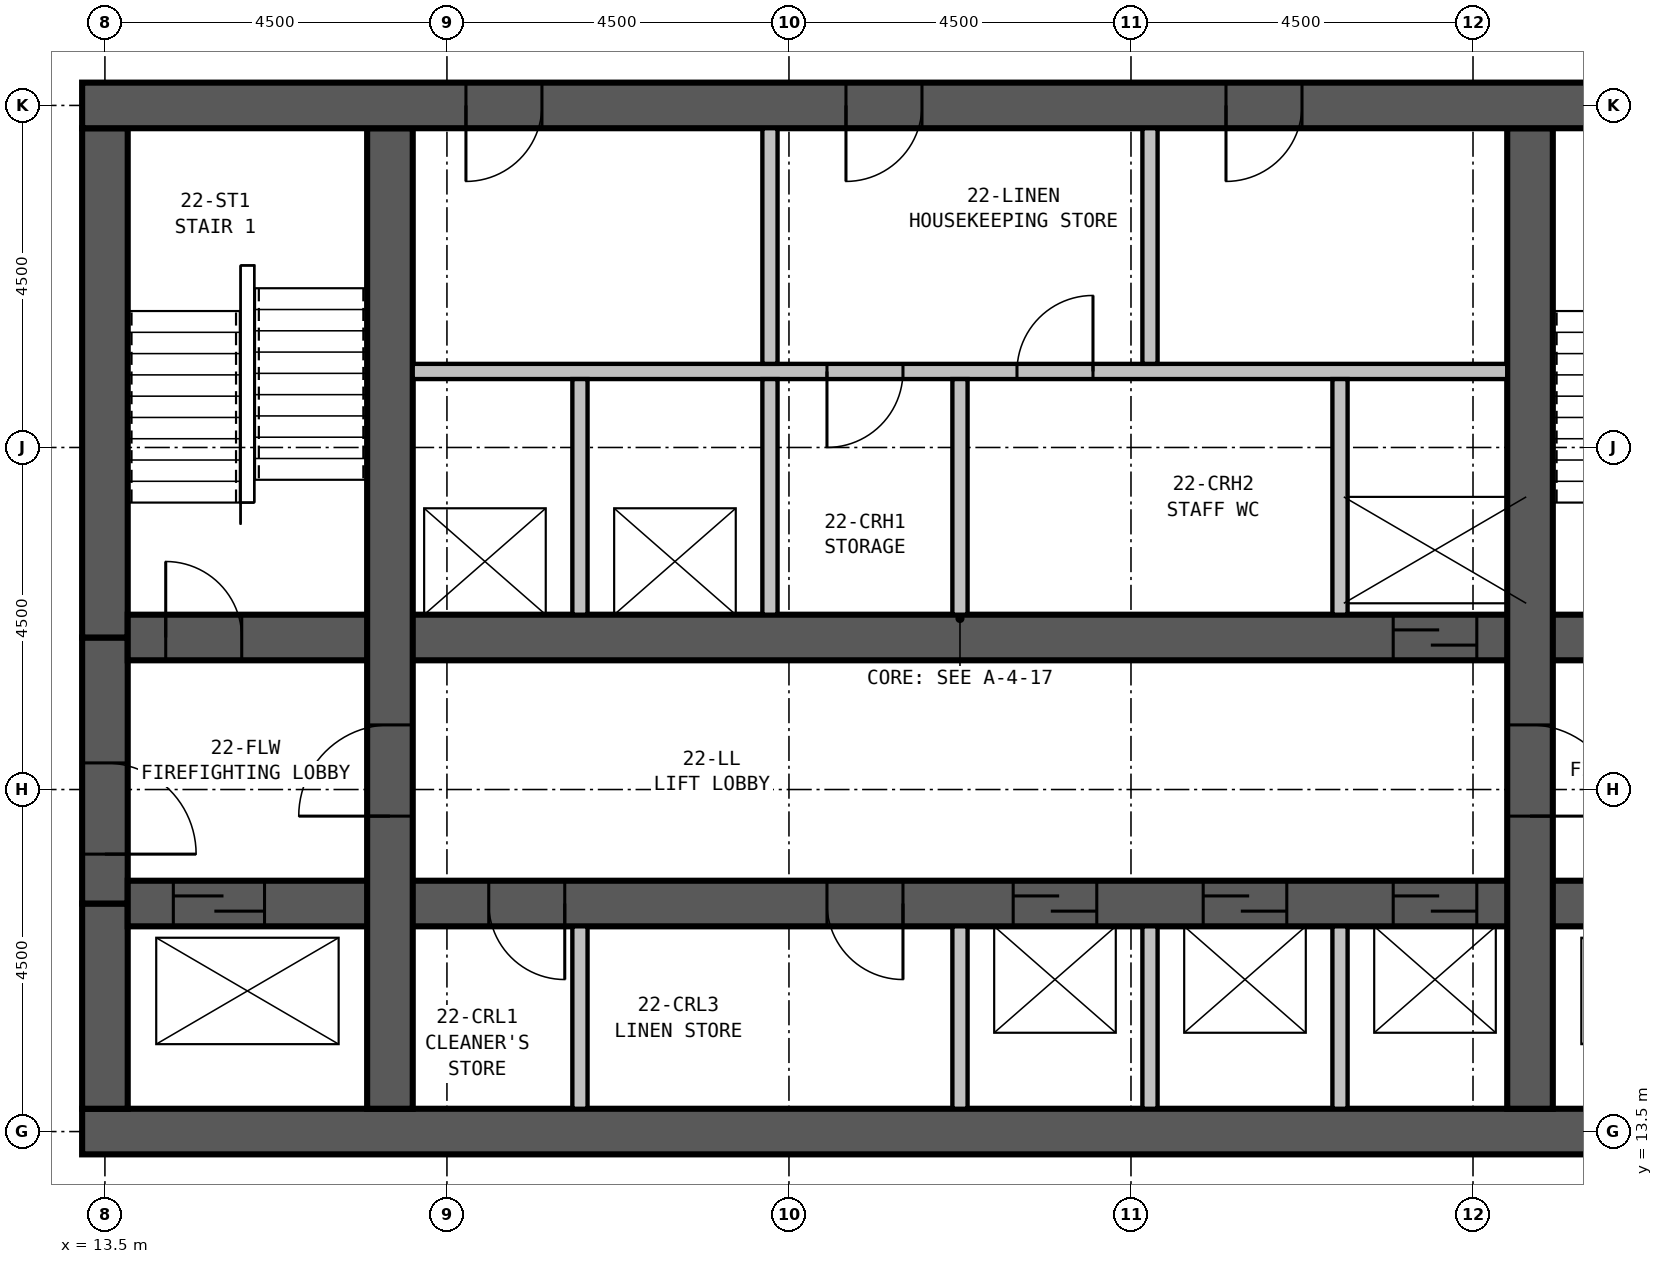
"""IFC4 building model, lengths in metres.
Left out: names, types, materials, properties, quantities, classifications, styles, units other than length and angle.
Written with IfcOpenShell. Run it as: python <this file> out.ifc"""

import sys

from ifc_helpers import new_model, si_unit, direction, frame, frame_2d, origin, place, context, subcontext, project, spatial, rectangle, extrude, element, fill, save


model = new_model("IFC4")
c1 = context("Model", 3, precision=1e-05, world=origin(), true_north=direction((0.0, 1.0)))
c2 = subcontext(c1, "Body", "Model", "MODEL_VIEW")
j1 = project(units=[si_unit("LENGTHUNIT", "METRE"), si_unit("PLANEANGLEUNIT", "RADIAN")], contexts=[c1])
p1 = place(None, origin())
s1 = spatial("IfcSite", under=j1, at=p1, CompositionType="ELEMENT")
p2 = place(p1, origin())
s2 = spatial("IfcBuilding", under=s1, at=p2, CompositionType="ELEMENT")
p3 = place(p2, frame((0.0, 0.0, 89.9)))
s3 = spatial("IfcBuildingStorey", under=s2, at=p3, CompositionType="ELEMENT", Elevation=89.9)
p4 = place(p3, frame((13.2, 13.5, 0.0), z_axis=(0.0, 0.0, 1.0), x_axis=(1.0, 0.0, 0.0)))
e1 = element("IfcWall", 1, at=p4, inside=s3, PredefinedType="SHEAR", context=c2, shape_type="SweptSolid", body=[
    extrude(rectangle(XDim=23.1, YDim=0.6, at=frame_2d((11.55, 0.0))), origin(), (0.0, 0.0, 1.0), 3.5),
])
p5 = place(p3, frame((36.3, 27.0, 0.0), z_axis=(0.0, 0.0, 1.0), x_axis=(-1.0, 0.0, 0.0)))
e2 = element("IfcWall", 2, at=p5, inside=s3, PredefinedType="SHEAR", context=c2, shape_type="SweptSolid", body=[
    extrude(rectangle(XDim=23.1, YDim=0.6, at=frame_2d((11.55, 0.0))), origin(), (0.0, 0.0, 1.0), 3.5),
])
p6 = place(p5, frame((17.05, 0.0, 0.0)))
e3 = element("IfcOpeningElement", 3, at=p6, cuts=e2, PredefinedType="OPENING", context=c2, shape_type="SweptSolid", body=[
    extrude(rectangle(XDim=1.0, YDim=2.1, at=frame_2d((0.5, 1.05))), frame((0.0, 0.31, 0.0), z_axis=(0.0, -1.0, 0.0), x_axis=(1.0, 0.0, 0.0)), (0.0, 0.0, 1.0), 0.62),
])
p7 = place(p5, frame((12.05, 0.0, 0.0)))
e4 = element("IfcOpeningElement", 4, at=p7, cuts=e2, PredefinedType="OPENING", context=c2, shape_type="SweptSolid", body=[
    extrude(rectangle(XDim=1.0, YDim=2.1, at=frame_2d((0.5, 1.05))), frame((0.0, 0.31, 0.0), z_axis=(0.0, -1.0, 0.0), x_axis=(1.0, 0.0, 0.0)), (0.0, 0.0, 1.0), 0.62),
])
p8 = place(p5, frame((7.05, 0.0, 0.0)))
e5 = element("IfcOpeningElement", 5, at=p8, cuts=e2, PredefinedType="OPENING", context=c2, shape_type="SweptSolid", body=[
    extrude(rectangle(XDim=1.0, YDim=2.1, at=frame_2d((0.5, 1.05))), frame((0.0, 0.31, 0.0), z_axis=(0.0, -1.0, 0.0), x_axis=(1.0, 0.0, 0.0)), (0.0, 0.0, 1.0), 0.62),
])
p9 = place(p3, frame((17.25, 13.8, 0.0), z_axis=(0.0, 0.0, 1.0), x_axis=(0.0, 1.0, 0.0)))
e6 = element("IfcWall", 6, at=p9, inside=s3, PredefinedType="SHEAR", context=c2, shape_type="SweptSolid", body=[
    extrude(rectangle(XDim=12.9, YDim=0.6, at=frame_2d((6.45, 0.0))), origin(), (0.0, 0.0, 1.0), 3.5),
])
p10 = place(p9, frame((3.85, 0.0, 0.0)))
e7 = element("IfcOpeningElement", 7, at=p10, cuts=e6, PredefinedType="OPENING", context=c2, shape_type="SweptSolid", body=[
    extrude(rectangle(XDim=1.2, YDim=2.1, at=frame_2d((0.6, 1.05))), frame((0.0, 0.31, 0.0), z_axis=(0.0, -1.0, 0.0), x_axis=(1.0, 0.0, 0.0)), (0.0, 0.0, 1.0), 0.62),
])
p11 = place(p3, frame((32.25, 13.8, 0.0), z_axis=(0.0, 0.0, 1.0), x_axis=(0.0, 1.0, 0.0)))
e8 = element("IfcWall", 8, at=p11, inside=s3, PredefinedType="SHEAR", context=c2, shape_type="SweptSolid", body=[
    extrude(rectangle(XDim=12.9, YDim=0.6, at=frame_2d((6.45, 0.0))), origin(), (0.0, 0.0, 1.0), 3.5),
])
p12 = place(p11, frame((5.05, 0.0, 0.0), z_axis=(0.0, 0.0, 1.0), x_axis=(-1.0, 0.0, 0.0)))
e9 = element("IfcOpeningElement", 9, at=p12, cuts=e8, PredefinedType="OPENING", context=c2, shape_type="SweptSolid", body=[
    extrude(rectangle(XDim=1.2, YDim=2.1, at=frame_2d((0.6, 1.05))), frame((0.0, 0.31, 0.0), z_axis=(0.0, -1.0, 0.0), x_axis=(1.0, 0.0, 0.0)), (0.0, 0.0, 1.0), 0.62),
])
p13 = place(p3, frame((13.8, 16.5, 0.0), z_axis=(0.0, 0.0, 1.0), x_axis=(1.0, 0.0, 0.0)))
e10 = element("IfcWall", 10, at=p13, inside=s3, PredefinedType="SHEAR", context=c2, shape_type="SweptSolid", body=[
    extrude(rectangle(XDim=21.9, YDim=0.6, at=frame_2d((10.95, 0.0))), origin(), (0.0, 0.0, 1.0), 3.5),
])
p14 = place(p13, frame((11.65, 0.0, 0.0)))
e11 = element("IfcOpeningElement", 11, at=p14, cuts=e10, PredefinedType="OPENING", context=c2, shape_type="SweptSolid", body=[
    extrude(rectangle(XDim=1.1, YDim=2.1, at=frame_2d((0.55, 1.05))), frame((0.0, 0.31, 0.0), z_axis=(0.0, -1.0, 0.0), x_axis=(1.0, 0.0, 0.0)), (0.0, 0.0, 1.0), 0.62),
])
p15 = place(p13, frame((14.15, 0.0, 0.0)))
e12 = element("IfcOpeningElement", 12, at=p15, cuts=e10, PredefinedType="OPENING", context=c2, shape_type="SweptSolid", body=[
    extrude(rectangle(XDim=1.1, YDim=2.1, at=frame_2d((0.55, 1.05))), frame((0.0, 0.31, 0.0), z_axis=(0.0, -1.0, 0.0), x_axis=(1.0, 0.0, 0.0)), (0.0, 0.0, 1.0), 0.62),
])
p16 = place(p13, frame((16.65, 0.0, 0.0)))
e13 = element("IfcOpeningElement", 13, at=p16, cuts=e10, PredefinedType="OPENING", context=c2, shape_type="SweptSolid", body=[
    extrude(rectangle(XDim=1.1, YDim=2.1, at=frame_2d((0.55, 1.05))), frame((0.0, 0.31, 0.0), z_axis=(0.0, -1.0, 0.0), x_axis=(1.0, 0.0, 0.0)), (0.0, 0.0, 1.0), 0.62),
])
p17 = place(p13, frame((5.75, 0.0, 0.0), z_axis=(0.0, 0.0, 1.0), x_axis=(-1.0, 0.0, 0.0)))
e14 = element("IfcOpeningElement", 14, at=p17, cuts=e10, PredefinedType="OPENING", context=c2, shape_type="SweptSolid", body=[
    extrude(rectangle(XDim=1.0, YDim=2.1, at=frame_2d((0.5, 1.05))), frame((0.0, 0.31, 0.0), z_axis=(0.0, -1.0, 0.0), x_axis=(1.0, 0.0, 0.0)), (0.0, 0.0, 1.0), 0.62),
])
p18 = place(p13, frame((10.2, 0.0, 0.0), z_axis=(0.0, 0.0, 1.0), x_axis=(-1.0, 0.0, 0.0)))
e15 = element("IfcOpeningElement", 15, at=p18, cuts=e10, PredefinedType="OPENING", context=c2, shape_type="SweptSolid", body=[
    extrude(rectangle(XDim=1.0, YDim=2.1, at=frame_2d((0.5, 1.05))), frame((0.0, 0.31, 0.0), z_axis=(0.0, -1.0, 0.0), x_axis=(1.0, 0.0, 0.0)), (0.0, 0.0, 1.0), 0.62),
])
p19 = place(p13, frame((0.6, 0.0, 0.0)))
e16 = element("IfcOpeningElement", 16, at=p19, cuts=e10, PredefinedType="OPENING", context=c2, shape_type="SweptSolid", body=[
    extrude(rectangle(XDim=1.2, YDim=2.1, at=frame_2d((0.6, 1.05))), frame((0.0, 0.31, 0.0), z_axis=(0.0, -1.0, 0.0), x_axis=(1.0, 0.0, 0.0)), (0.0, 0.0, 1.0), 0.62),
])
p20 = place(p13, frame((19.6, 0.0, 0.0)))
e17 = element("IfcOpeningElement", 17, at=p20, cuts=e10, PredefinedType="OPENING", context=c2, shape_type="SweptSolid", body=[
    extrude(rectangle(XDim=1.2, YDim=2.1, at=frame_2d((0.6, 1.05))), frame((0.0, 0.31, 0.0), z_axis=(0.0, -1.0, 0.0), x_axis=(1.0, 0.0, 0.0)), (0.0, 0.0, 1.0), 0.62),
])
p21 = place(p3, frame((13.8, 20.0, 0.0), z_axis=(0.0, 0.0, 1.0), x_axis=(1.0, 0.0, 0.0)))
e18 = element("IfcWall", 18, at=p21, inside=s3, PredefinedType="SHEAR", context=c2, shape_type="SweptSolid", body=[
    extrude(rectangle(XDim=21.9, YDim=0.6, at=frame_2d((10.95, 0.0))), origin(), (0.0, 0.0, 1.0), 3.5),
])
p22 = place(p21, frame((0.5, 0.0, 0.0)))
e19 = element("IfcOpeningElement", 19, at=p22, cuts=e18, PredefinedType="OPENING", context=c2, shape_type="SweptSolid", body=[
    extrude(rectangle(XDim=1.0, YDim=2.1, at=frame_2d((0.5, 1.05))), frame((0.0, 0.31, 0.0), z_axis=(0.0, -1.0, 0.0), x_axis=(1.0, 0.0, 0.0)), (0.0, 0.0, 1.0), 0.62),
])
p23 = place(p21, frame((20.5, 0.0, 0.0)))
e20 = element("IfcOpeningElement", 20, at=p23, cuts=e18, PredefinedType="OPENING", context=c2, shape_type="SweptSolid", body=[
    extrude(rectangle(XDim=1.0, YDim=2.1, at=frame_2d((0.5, 1.05))), frame((0.0, 0.31, 0.0), z_axis=(0.0, -1.0, 0.0), x_axis=(1.0, 0.0, 0.0)), (0.0, 0.0, 1.0), 0.62),
])
p24 = place(p21, frame((16.65, 0.0, 0.0)))
e21 = element("IfcOpeningElement", 21, at=p24, cuts=e18, PredefinedType="OPENING", context=c2, shape_type="SweptSolid", body=[
    extrude(rectangle(XDim=1.1, YDim=2.1, at=frame_2d((0.55, 1.05))), frame((0.0, 0.31, 0.0), z_axis=(0.0, -1.0, 0.0), x_axis=(1.0, 0.0, 0.0)), (0.0, 0.0, 1.0), 0.62),
])
p25 = place(p3, frame((13.5, 26.7, 0.0), z_axis=(0.0, 0.0, 1.0), x_axis=(0.0, -1.0, 0.0)))
e22 = element("IfcWall", 22, at=p25, inside=s3, PredefinedType="SHEAR", context=c2, shape_type="SweptSolid", body=[
    extrude(rectangle(XDim=6.7, YDim=0.6, at=frame_2d((3.35, 0.0))), origin(), (0.0, 0.0, 1.0), 3.5),
])
p26 = place(p3, frame((13.5, 20.0, 0.0), z_axis=(0.0, 0.0, 1.0), x_axis=(0.0, -1.0, 0.0)))
e23 = element("IfcWall", 23, at=p26, inside=s3, PredefinedType="SHEAR", context=c2, shape_type="SweptSolid", body=[
    extrude(rectangle(XDim=3.5, YDim=0.6, at=frame_2d((1.75, 0.0))), origin(), (0.0, 0.0, 1.0), 3.5),
])
p27 = place(p26, frame((1.65, 0.0, 0.0)))
e24 = element("IfcOpeningElement", 24, at=p27, cuts=e23, PredefinedType="OPENING", context=c2, shape_type="SweptSolid", body=[
    extrude(rectangle(XDim=1.2, YDim=2.1, at=frame_2d((0.6, 1.05))), frame((0.0, 0.31, 0.0), z_axis=(0.0, -1.0, 0.0), x_axis=(1.0, 0.0, 0.0)), (0.0, 0.0, 1.0), 0.62),
])
p28 = place(p3, frame((13.5, 16.5, 0.0), z_axis=(0.0, 0.0, 1.0), x_axis=(0.0, -1.0, 0.0)))
e25 = element("IfcWall", 25, at=p28, inside=s3, PredefinedType="SHEAR", context=c2, shape_type="SweptSolid", body=[
    extrude(rectangle(XDim=2.7, YDim=0.6, at=frame_2d((1.35, 0.0))), origin(), (0.0, 0.0, 1.0), 3.5),
])
p29 = place(p3, frame((19.75, 13.8, 0.0), z_axis=(0.0, 0.0, 1.0), x_axis=(0.0, 1.0, 0.0)))
e26 = element("IfcWall", 26, at=p29, inside=s3, PredefinedType="PARTITIONING", context=c2, shape_type="SweptSolid", body=[
    extrude(rectangle(XDim=2.4, YDim=0.2, at=frame_2d((1.2, 0.0))), origin(), (0.0, 0.0, 1.0), 3.25),
])
for number, where, z_axis, x_axis in (
    (27, (19.75, 20.3, 0.0), (0.0, 0.0, 1.0), (0.0, 1.0, 0.0)),
    (28, (22.25, 20.3, 0.0), (0.0, 0.0, 1.0), (0.0, 1.0, 0.0)),
):
    element("IfcWall", number, at=place(p3, frame(where, z_axis=z_axis, x_axis=x_axis)), inside=s3, PredefinedType="PARTITIONING", context=c2, shape_type="SweptSolid", body=[
        extrude(rectangle(XDim=3.1, YDim=0.2, at=frame_2d((1.55, 0.0))), origin(), (0.0, 0.0, 1.0), 3.25),
    ])
p30 = place(p3, frame((24.75, 13.8, 0.0), z_axis=(0.0, 0.0, 1.0), x_axis=(0.0, 1.0, 0.0)))
e29 = element("IfcWall", 29, at=p30, inside=s3, PredefinedType="PARTITIONING", context=c2, shape_type="SweptSolid", body=[
    extrude(rectangle(XDim=2.4, YDim=0.2, at=frame_2d((1.2, 0.0))), origin(), (0.0, 0.0, 1.0), 3.25),
])
p31 = place(p3, frame((24.75, 20.3, 0.0), z_axis=(0.0, 0.0, 1.0), x_axis=(0.0, 1.0, 0.0)))
e30 = element("IfcWall", 30, at=p31, inside=s3, PredefinedType="PARTITIONING", context=c2, shape_type="SweptSolid", body=[
    extrude(rectangle(XDim=3.1, YDim=0.2, at=frame_2d((1.55, 0.0))), origin(), (0.0, 0.0, 1.0), 3.25),
])
for number, where, z_axis, x_axis in (
    (31, (27.25, 13.8, 0.0), (0.0, 0.0, 1.0), (0.0, 1.0, 0.0)),
    (32, (29.75, 13.8, 0.0), (0.0, 0.0, 1.0), (0.0, 1.0, 0.0)),
):
    element("IfcWall", number, at=place(p3, frame(where, z_axis=z_axis, x_axis=x_axis)), inside=s3, PredefinedType="PARTITIONING", context=c2, shape_type="SweptSolid", body=[
        extrude(rectangle(XDim=2.4, YDim=0.2, at=frame_2d((1.2, 0.0))), origin(), (0.0, 0.0, 1.0), 3.25),
    ])
p32 = place(p3, frame((29.75, 20.3, 0.0), z_axis=(0.0, 0.0, 1.0), x_axis=(0.0, 1.0, 0.0)))
e33 = element("IfcWall", 33, at=p32, inside=s3, PredefinedType="PARTITIONING", context=c2, shape_type="SweptSolid", body=[
    extrude(rectangle(XDim=3.1, YDim=0.2, at=frame_2d((1.55, 0.0))), origin(), (0.0, 0.0, 1.0), 3.25),
])
p33 = place(p3, frame((17.55, 23.5, 0.0), z_axis=(0.0, 0.0, 1.0), x_axis=(1.0, 0.0, 0.0)))
e34 = element("IfcWall", 34, at=p33, inside=s3, PredefinedType="PARTITIONING", context=c2, shape_type="SweptSolid", body=[
    extrude(rectangle(XDim=14.4, YDim=0.2, at=frame_2d((7.2, 0.0))), origin(), (0.0, 0.0, 1.0), 3.25),
])
p34 = place(p33, frame((6.45, 0.0, 0.0), z_axis=(0.0, 0.0, 1.0), x_axis=(-1.0, 0.0, 0.0)))
e35 = element("IfcOpeningElement", 35, at=p34, cuts=e34, PredefinedType="OPENING", context=c2, shape_type="SweptSolid", body=[
    extrude(rectangle(XDim=1.0, YDim=2.1, at=frame_2d((0.5, 1.05))), frame((0.0, 0.11, 0.0), z_axis=(0.0, -1.0, 0.0), x_axis=(1.0, 0.0, 0.0)), (0.0, 0.0, 1.0), 0.22),
])
p35 = place(p33, frame((7.95, 0.0, 0.0)))
e36 = element("IfcOpeningElement", 36, at=p35, cuts=e34, PredefinedType="OPENING", context=c2, shape_type="SweptSolid", body=[
    extrude(rectangle(XDim=1.0, YDim=2.1, at=frame_2d((0.5, 1.05))), frame((0.0, 0.11, 0.0), z_axis=(0.0, -1.0, 0.0), x_axis=(1.0, 0.0, 0.0)), (0.0, 0.0, 1.0), 0.22),
])
for number, where, z_axis, x_axis in (
    (37, (22.25, 23.6, 0.0), (0.0, 0.0, 1.0), (0.0, 1.0, 0.0)),
    (38, (27.25, 23.6, 0.0), (0.0, 0.0, 1.0), (0.0, 1.0, 0.0)),
):
    element("IfcWall", number, at=place(p3, frame(where, z_axis=z_axis, x_axis=x_axis)), inside=s3, PredefinedType="PARTITIONING", context=c2, shape_type="SweptSolid", body=[
        extrude(rectangle(XDim=3.1, YDim=0.2, at=frame_2d((1.55, 0.0))), origin(), (0.0, 0.0, 1.0), 3.25),
    ])
p36 = place(p34, origin())
e39 = element("IfcDoor", 39, at=p36, inside=s3, OperationType="SINGLE_SWING_RIGHT", PredefinedType="DOOR", context=c2, shape_type="SweptSolid", body=[
    extrude(rectangle(XDim=1.0, YDim=2.1, at=frame_2d((0.5, 1.05))), frame((0.0, 0.025, 0.0), z_axis=(0.0, -1.0, 0.0), x_axis=(1.0, 0.0, 0.0)), (0.0, 0.0, 1.0), 0.05),
])
fill(e35, e39)
p37 = place(p35, origin())
e40 = element("IfcDoor", 40, at=p37, inside=s3, OperationType="SINGLE_SWING_RIGHT", PredefinedType="DOOR", context=c2, shape_type="SweptSolid", body=[
    extrude(rectangle(XDim=1.0, YDim=2.1, at=frame_2d((0.5, 1.05))), frame((0.0, 0.025, 0.0), z_axis=(0.0, -1.0, 0.0), x_axis=(1.0, 0.0, 0.0)), (0.0, 0.0, 1.0), 0.05),
])
fill(e36, e40)
p38 = place(p27, origin())
e41 = element("IfcDoor", 41, at=p38, inside=s3, OperationType="SINGLE_SWING_RIGHT", PredefinedType="DOOR", context=c2, shape_type="SweptSolid", body=[
    extrude(rectangle(XDim=1.2, YDim=2.1, at=frame_2d((0.6, 1.05))), frame((0.0, 0.3, 0.0), z_axis=(0.0, -1.0, 0.0), x_axis=(1.0, 0.0, 0.0)), (0.0, 0.0, 1.0), 0.6),
])
fill(e24, e41)
p39 = place(p10, origin())
e42 = element("IfcDoor", 42, at=p39, inside=s3, OperationType="SINGLE_SWING_LEFT", PredefinedType="DOOR", context=c2, shape_type="SweptSolid", body=[
    extrude(rectangle(XDim=1.2, YDim=2.1, at=frame_2d((0.6, 1.05))), frame((0.0, 0.3, 0.0), z_axis=(0.0, -1.0, 0.0), x_axis=(1.0, 0.0, 0.0)), (0.0, 0.0, 1.0), 0.6),
])
fill(e7, e42)
p40 = place(p12, origin())
e43 = element("IfcDoor", 43, at=p40, inside=s3, OperationType="SINGLE_SWING_RIGHT", PredefinedType="DOOR", context=c2, shape_type="SweptSolid", body=[
    extrude(rectangle(XDim=1.2, YDim=2.1, at=frame_2d((0.6, 1.05))), frame((0.0, 0.3, 0.0), z_axis=(0.0, -1.0, 0.0), x_axis=(1.0, 0.0, 0.0)), (0.0, 0.0, 1.0), 0.6),
])
fill(e9, e43)
p41 = place(p22, origin())
e44 = element("IfcDoor", 44, at=p41, inside=s3, OperationType="SINGLE_SWING_LEFT", PredefinedType="DOOR", context=c2, shape_type="SweptSolid", body=[
    extrude(rectangle(XDim=1.0, YDim=2.1, at=frame_2d((0.5, 1.05))), frame((0.0, 0.3, 0.0), z_axis=(0.0, -1.0, 0.0), x_axis=(1.0, 0.0, 0.0)), (0.0, 0.0, 1.0), 0.6),
])
fill(e19, e44)
p42 = place(p14, origin())
e45 = element("IfcDoor", 45, at=p42, inside=s3, OperationType="SLIDING_TO_LEFT", PredefinedType="DOOR", context=c2, shape_type="SweptSolid", body=[
    extrude(rectangle(XDim=1.1, YDim=2.1, at=frame_2d((0.55, 1.05))), frame((0.0, 0.3, 0.0), z_axis=(0.0, -1.0, 0.0), x_axis=(1.0, 0.0, 0.0)), (0.0, 0.0, 1.0), 0.6),
])
fill(e11, e45)
p43 = place(p15, origin())
e46 = element("IfcDoor", 46, at=p43, inside=s3, OperationType="SLIDING_TO_LEFT", PredefinedType="DOOR", context=c2, shape_type="SweptSolid", body=[
    extrude(rectangle(XDim=1.1, YDim=2.1, at=frame_2d((0.55, 1.05))), frame((0.0, 0.3, 0.0), z_axis=(0.0, -1.0, 0.0), x_axis=(1.0, 0.0, 0.0)), (0.0, 0.0, 1.0), 0.6),
])
fill(e12, e46)
p44 = place(p16, origin())
e47 = element("IfcDoor", 47, at=p44, inside=s3, OperationType="SLIDING_TO_LEFT", PredefinedType="DOOR", context=c2, shape_type="SweptSolid", body=[
    extrude(rectangle(XDim=1.1, YDim=2.1, at=frame_2d((0.55, 1.05))), frame((0.0, 0.3, 0.0), z_axis=(0.0, -1.0, 0.0), x_axis=(1.0, 0.0, 0.0)), (0.0, 0.0, 1.0), 0.6),
])
fill(e13, e47)
p45 = place(p24, origin())
e48 = element("IfcDoor", 48, at=p45, inside=s3, OperationType="SLIDING_TO_LEFT", PredefinedType="DOOR", context=c2, shape_type="SweptSolid", body=[
    extrude(rectangle(XDim=1.1, YDim=2.1, at=frame_2d((0.55, 1.05))), frame((0.0, 0.3, 0.0), z_axis=(0.0, -1.0, 0.0), x_axis=(1.0, 0.0, 0.0)), (0.0, 0.0, 1.0), 0.6),
])
fill(e21, e48)
p46 = place(p17, origin())
e49 = element("IfcDoor", 49, at=p46, inside=s3, OperationType="SINGLE_SWING_LEFT", PredefinedType="DOOR", context=c2, shape_type="SweptSolid", body=[
    extrude(rectangle(XDim=1.0, YDim=2.1, at=frame_2d((0.5, 1.05))), frame((0.0, 0.3, 0.0), z_axis=(0.0, -1.0, 0.0), x_axis=(1.0, 0.0, 0.0)), (0.0, 0.0, 1.0), 0.6),
])
fill(e14, e49)
p47 = place(p18, origin())
e50 = element("IfcDoor", 50, at=p47, inside=s3, OperationType="SINGLE_SWING_LEFT", PredefinedType="DOOR", context=c2, shape_type="SweptSolid", body=[
    extrude(rectangle(XDim=1.0, YDim=2.1, at=frame_2d((0.5, 1.05))), frame((0.0, 0.3, 0.0), z_axis=(0.0, -1.0, 0.0), x_axis=(1.0, 0.0, 0.0)), (0.0, 0.0, 1.0), 0.6),
])
fill(e15, e50)
p48 = place(p19, origin())
e51 = element("IfcDoor", 51, at=p48, inside=s3, OperationType="SLIDING_TO_LEFT", PredefinedType="DOOR", context=c2, shape_type="SweptSolid", body=[
    extrude(rectangle(XDim=1.2, YDim=2.1, at=frame_2d((0.6, 1.05))), frame((0.0, 0.3, 0.0), z_axis=(0.0, -1.0, 0.0), x_axis=(1.0, 0.0, 0.0)), (0.0, 0.0, 1.0), 0.6),
])
fill(e16, e51)
p49 = place(p6, origin())
e52 = element("IfcDoor", 52, at=p49, inside=s3, OperationType="SINGLE_SWING_RIGHT", PredefinedType="DOOR", context=c2, shape_type="SweptSolid", body=[
    extrude(rectangle(XDim=1.0, YDim=2.1, at=frame_2d((0.5, 1.05))), frame((0.0, 0.3, 0.0), z_axis=(0.0, -1.0, 0.0), x_axis=(1.0, 0.0, 0.0)), (0.0, 0.0, 1.0), 0.6),
])
fill(e3, e52)
p50 = place(p7, origin())
e53 = element("IfcDoor", 53, at=p50, inside=s3, OperationType="SINGLE_SWING_RIGHT", PredefinedType="DOOR", context=c2, shape_type="SweptSolid", body=[
    extrude(rectangle(XDim=1.0, YDim=2.1, at=frame_2d((0.5, 1.05))), frame((0.0, 0.3, 0.0), z_axis=(0.0, -1.0, 0.0), x_axis=(1.0, 0.0, 0.0)), (0.0, 0.0, 1.0), 0.6),
])
fill(e4, e53)
p51 = place(p8, origin())
e54 = element("IfcDoor", 54, at=p51, inside=s3, OperationType="SINGLE_SWING_RIGHT", PredefinedType="DOOR", context=c2, shape_type="SweptSolid", body=[
    extrude(rectangle(XDim=1.0, YDim=2.1, at=frame_2d((0.5, 1.05))), frame((0.0, 0.3, 0.0), z_axis=(0.0, -1.0, 0.0), x_axis=(1.0, 0.0, 0.0)), (0.0, 0.0, 1.0), 0.6),
])
fill(e5, e54)
save(model, sys.argv[1])
